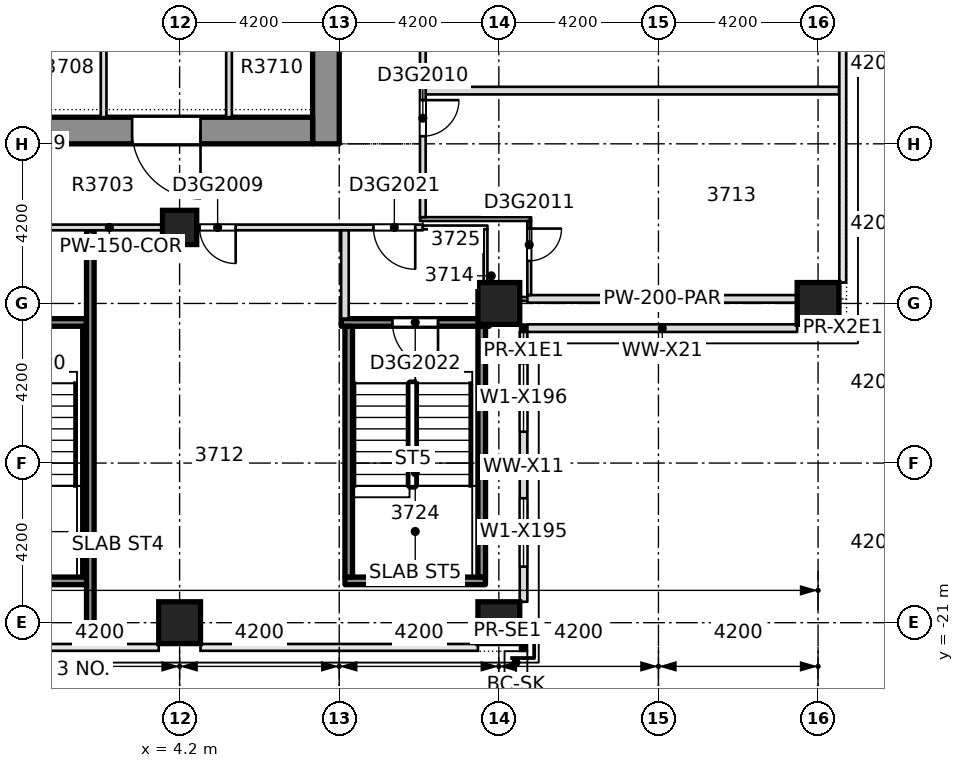
"""IFC4 building model, lengths in metres.
Left out: names, types, materials, properties, quantities, classifications, styles, units other than length and angle.
Written with IfcOpenShell. Run it as: python <this file> out.ifc"""

import sys

from ifc_helpers import new_model, si_unit, direction, frame, frame_2d, origin, origin_2d, place, context, subcontext, project, spatial, rectangle, extrude, element, fill, save


model = new_model("IFC4")
c1 = context("Model", 3, precision=1e-05, world=origin(), true_north=direction((0.0, 1.0)))
c2 = subcontext(c1, "Body", "Model", "MODEL_VIEW")
j1 = project(units=[si_unit("LENGTHUNIT", "METRE"), si_unit("PLANEANGLEUNIT", "RADIAN")], contexts=[c1])
p1 = place(None, origin())
s1 = spatial("IfcSite", under=j1, at=p1, CompositionType="ELEMENT")
p2 = place(p1, origin())
s2 = spatial("IfcBuilding", under=s1, at=p2, CompositionType="ELEMENT")
p3 = place(p2, frame((0.0, 0.0, 146.9)))
s3 = spatial("IfcBuildingStorey", under=s2, at=p3, CompositionType="ELEMENT", Elevation=146.9)
p4 = place(p3, frame((8.05, -8.4, -0.4), z_axis=(0.0, 0.0, 1.0), x_axis=(0.0, 1.0, 0.0)))
e1 = element("IfcWall", 1, at=p4, inside=s3, PredefinedType="SOLIDWALL", context=c2, shape_type="SweptSolid", body=[
    extrude(rectangle(XDim=30.15, YDim=0.7, at=frame_2d((15.075, 0.0))), origin(), (0.0, 0.0, 1.0), 3.45),
])
p5 = place(p4, frame((19.3, 0.0, 0.4)))
e2 = element("IfcOpeningElement", 2, at=p5, cuts=e1, PredefinedType="OPENING", context=c2, shape_type="SweptSolid", body=[
    extrude(rectangle(XDim=1.2, YDim=2.1, at=frame_2d((0.6, 1.05))), frame((0.0, 0.36, 0.0), z_axis=(0.0, -1.0, 0.0), x_axis=(1.0, 0.0, 0.0)), (0.0, 0.0, 1.0), 0.72),
])
p6 = place(p3, frame((-7.7, -8.05, -0.4), z_axis=(0.0, 0.0, 1.0), x_axis=(1.0, 0.0, 0.0)))
e3 = element("IfcWall", 3, at=p6, inside=s3, PredefinedType="SHEAR", context=c2, shape_type="SweptSolid", body=[
    extrude(rectangle(XDim=15.4, YDim=0.7, at=frame_2d((7.7, 0.0))), origin(), (0.0, 0.0, 1.0), 3.45),
])
p7 = place(p6, frame((2.95, 0.0, 0.4)))
e4 = element("IfcOpeningElement", 4, at=p7, cuts=e3, PredefinedType="OPENING", context=c2, shape_type="SweptSolid", body=[
    extrude(rectangle(XDim=1.8, YDim=2.1, at=frame_2d((0.9, 1.05))), frame((0.0, 0.36, 0.0), z_axis=(0.0, -1.0, 0.0), x_axis=(1.0, 0.0, 0.0)), (0.0, 0.0, 1.0), 0.72),
])
p8 = place(p6, frame((10.65, 0.0, 0.4)))
e5 = element("IfcOpeningElement", 5, at=p8, cuts=e3, PredefinedType="OPENING", context=c2, shape_type="SweptSolid", body=[
    extrude(rectangle(XDim=1.8, YDim=2.1, at=frame_2d((0.9, 1.05))), frame((0.0, 0.36, 0.0), z_axis=(0.0, -1.0, 0.0), x_axis=(1.0, 0.0, 0.0)), (0.0, 0.0, 1.0), 0.72),
])
for number, where, z_axis, x_axis in (
    (6, (4.2, -21.0, -0.4), (0.0, 0.0, 1.0), (1.0, 0.0, 0.0)),
    (7, (12.6, -21.0, -0.4), (0.0, 0.0, 1.0), (1.0, 0.0, 0.0)),
    (8, (12.6, -12.6, -0.4), (0.0, 0.0, 1.0), (1.0, 0.0, 0.0)),
    (9, (21.0, -12.6, -0.4), (0.0, 0.0, 1.0), (1.0, 0.0, 0.0)),
):
    element("IfcColumn", number, at=place(p3, frame(where, z_axis=z_axis, x_axis=x_axis)), inside=s3, PredefinedType="COLUMN", context=c2, shape_type="SweptSolid", body=[
        extrude(rectangle(XDim=1.1, YDim=1.1, at=origin_2d()), origin(), (0.0, 0.0, 1.0), 3.45),
    ])
p9 = place(p3, frame((4.2, -10.6, -0.4), z_axis=(0.0, 0.0, 1.0), x_axis=(1.0, 0.0, 0.0)))
e10 = element("IfcColumn", 10, at=p9, inside=s3, PredefinedType="COLUMN", context=c2, shape_type="SweptSolid", body=[
    extrude(rectangle(XDim=0.9, YDim=0.9, at=origin_2d()), origin(), (0.0, 0.0, 1.0), 3.45),
])
p10 = place(p3, frame((-1.848, -19.9, 0.0), z_axis=(0.0, 0.0, 1.0), x_axis=(1.0, 0.0, 0.0)))
e11 = element("IfcWall", 11, at=p10, inside=s3, PredefinedType="SOLIDWALL", context=c2, shape_type="SweptSolid", body=[
    extrude(rectangle(XDim=3.696, YDim=0.2, at=frame_2d((1.848, 0.0))), origin(), (0.0, 0.0, 1.0), 3.05),
])
p11 = place(p3, frame((8.552, -19.9, 0.0), z_axis=(0.0, 0.0, 1.0), x_axis=(1.0, 0.0, 0.0)))
e12 = element("IfcWall", 12, at=p11, inside=s3, PredefinedType="SOLIDWALL", context=c2, shape_type="SweptSolid", body=[
    extrude(rectangle(XDim=3.696, YDim=0.2, at=frame_2d((1.848, 0.0))), origin(), (0.0, 0.0, 1.0), 3.05),
])
p12 = place(p3, frame((-1.948, -13.1, 0.0), z_axis=(0.0, 0.0, 1.0), x_axis=(1.0, 0.0, 0.0)))
e13 = element("IfcWall", 13, at=p12, inside=s3, PredefinedType="SOLIDWALL", context=c2, shape_type="SweptSolid", body=[
    extrude(rectangle(XDim=3.696, YDim=0.2, at=frame_2d((1.848, 0.0))), origin(), (0.0, 0.0, 1.0), 3.05),
])
p13 = place(p12, frame((1.348, 0.0, 0.0)))
e14 = element("IfcOpeningElement", 14, at=p13, cuts=e13, PredefinedType="OPENING", context=c2, shape_type="SweptSolid", body=[
    extrude(rectangle(XDim=1.2, YDim=2.1, at=frame_2d((0.6, 1.05))), frame((0.0, 0.11, 0.0), z_axis=(0.0, -1.0, 0.0), x_axis=(1.0, 0.0, 0.0)), (0.0, 0.0, 1.0), 0.22),
])
p14 = place(p3, frame((8.452, -13.1, 0.0), z_axis=(0.0, 0.0, 1.0), x_axis=(1.0, 0.0, 0.0)))
e15 = element("IfcWall", 15, at=p14, inside=s3, PredefinedType="SOLIDWALL", context=c2, shape_type="SweptSolid", body=[
    extrude(rectangle(XDim=3.896, YDim=0.2, at=frame_2d((1.948, 0.0))), origin(), (0.0, 0.0, 1.0), 3.05),
])
p15 = place(p14, frame((1.348, 0.0, 0.0)))
e16 = element("IfcOpeningElement", 16, at=p15, cuts=e15, PredefinedType="OPENING", context=c2, shape_type="SweptSolid", body=[
    extrude(rectangle(XDim=1.2, YDim=2.1, at=frame_2d((0.6, 1.05))), frame((0.0, 0.11, 0.0), z_axis=(0.0, -1.0, 0.0), x_axis=(1.0, 0.0, 0.0)), (0.0, 0.0, 1.0), 0.22),
])
p16 = place(p3, frame((12.152, -12.48, 0.0), z_axis=(0.0, 0.0, 1.0), x_axis=(1.0, 0.0, 0.0)))
e17 = element("IfcWall", 17, at=p16, inside=s3, PredefinedType="PARTITIONING", context=c2, shape_type="SweptSolid", body=[
    extrude(rectangle(XDim=1.298, YDim=0.1, at=frame_2d((0.649, 0.0))), origin(), (0.0, 0.0, 1.0), 3.05),
])
p17 = place(p3, frame((13.35, -12.48, 0.0), z_axis=(0.0, 0.0, 1.0), x_axis=(1.0, 0.0, 0.0)))
e18 = element("IfcWall", 18, at=p17, inside=s3, PredefinedType="PARTITIONING", context=c2, shape_type="SweptSolid", body=[
    extrude(rectangle(XDim=7.1, YDim=0.2, at=frame_2d((3.55, 0.0))), origin(), (0.0, 0.0, 1.0), 2.5),
])
p18 = place(p3, frame((-5.9, -10.6, 0.0), z_axis=(0.0, 0.0, 1.0), x_axis=(1.0, 0.0, 0.0)))
e19 = element("IfcWall", 19, at=p18, inside=s3, PredefinedType="PARTITIONING", context=c2, shape_type="SweptSolid", body=[
    extrude(rectangle(XDim=16.5, YDim=0.15, at=frame_2d((8.25, 0.0))), origin(), (0.0, 0.0, 1.0), 3.05),
])
p19 = place(p18, frame((2.225, 0.0, 0.0)))
e20 = element("IfcOpeningElement", 20, at=p19, cuts=e19, PredefinedType="OPENING", context=c2, shape_type="SweptSolid", body=[
    extrude(rectangle(XDim=0.95, YDim=2.1, at=frame_2d((0.475, 1.05))), frame((0.0, 0.085, 0.0), z_axis=(0.0, -1.0, 0.0), x_axis=(1.0, 0.0, 0.0)), (0.0, 0.0, 1.0), 0.17),
])
p20 = place(p18, frame((10.625, 0.0, 0.0)))
e21 = element("IfcOpeningElement", 21, at=p20, cuts=e19, PredefinedType="OPENING", context=c2, shape_type="SweptSolid", body=[
    extrude(rectangle(XDim=0.95, YDim=2.1, at=frame_2d((0.475, 1.05))), frame((0.0, 0.085, 0.0), z_axis=(0.0, -1.0, 0.0), x_axis=(1.0, 0.0, 0.0)), (0.0, 0.0, 1.0), 0.17),
])
p21 = place(p18, frame((5.35, 0.0, 0.0)))
e22 = element("IfcOpeningElement", 22, at=p21, cuts=e19, PredefinedType="OPENING", context=c2, shape_type="SweptSolid", body=[
    extrude(rectangle(XDim=1.1, YDim=2.1, at=frame_2d((0.55, 1.05))), frame((0.0, 0.085, 0.0), z_axis=(0.0, -1.0, 0.0), x_axis=(1.0, 0.0, 0.0)), (0.0, 0.0, 1.0), 0.17),
])
p22 = place(p18, frame((15.2, 0.0, 0.0)))
e23 = element("IfcOpeningElement", 23, at=p22, cuts=e19, PredefinedType="OPENING", context=c2, shape_type="SweptSolid", body=[
    extrude(rectangle(XDim=1.1, YDim=2.1, at=frame_2d((0.55, 1.05))), frame((0.0, 0.085, 0.0), z_axis=(0.0, -1.0, 0.0), x_axis=(1.0, 0.0, 0.0)), (0.0, 0.0, 1.0), 0.17),
])
p23 = place(p3, frame((10.6, -10.6, 0.0), z_axis=(0.0, 0.0, 1.0), x_axis=(1.0, 0.0, 0.0)))
e24 = element("IfcWall", 24, at=p23, inside=s3, PredefinedType="PARTITIONING", context=c2, shape_type="SweptSolid", body=[
    extrude(rectangle(XDim=1.7, YDim=0.1, at=frame_2d((0.85, 0.0))), origin(), (0.0, 0.0, 1.0), 3.05),
])
p24 = place(p3, frame((10.525, -10.38, 0.0), z_axis=(0.0, 0.0, 1.0), x_axis=(1.0, 0.0, 0.0)))
e25 = element("IfcWall", 25, at=p24, inside=s3, PredefinedType="PARTITIONING", context=c2, shape_type="SweptSolid", body=[
    extrude(rectangle(XDim=2.925, YDim=0.1, at=frame_2d((1.462, 0.0))), origin(), (0.0, 0.0, 1.0), 3.05),
])
p25 = place(p3, frame((10.675, -7.0, 0.0), z_axis=(0.0, 0.0, 1.0), x_axis=(1.0, 0.0, 0.0)))
e26 = element("IfcWall", 26, at=p25, inside=s3, PredefinedType="PARTITIONING", context=c2, shape_type="SweptSolid", body=[
    extrude(rectangle(XDim=10.875, YDim=0.2, at=frame_2d((5.438, 0.0))), origin(), (0.0, 0.0, 1.0), 3.05),
])
p26 = place(p3, frame((1.75, -19.798, 0.0), z_axis=(0.0, 0.0, 1.0), x_axis=(0.0, 1.0, 0.0)))
e27 = element("IfcWall", 27, at=p26, inside=s3, PredefinedType="SOLIDWALL", context=c2, shape_type="SweptSolid", body=[
    extrude(rectangle(XDim=6.596, YDim=0.2, at=frame_2d((3.298, 0.0))), origin(), (0.0, 0.0, 1.0), 3.05),
])
p27 = place(p3, frame((8.55, -12.998, 0.0), z_axis=(0.0, 0.0, 1.0), x_axis=(0.0, 1.0, 0.0)))
e28 = element("IfcWall", 28, at=p27, inside=s3, PredefinedType="PARTITIONING", context=c2, shape_type="SweptSolid", body=[
    extrude(rectangle(XDim=2.323, YDim=0.2, at=frame_2d((1.162, 0.0))), origin(), (0.0, 0.0, 1.0), 3.05),
])
p28 = place(p3, frame((8.65, -19.798, 0.0), z_axis=(0.0, 0.0, 1.0), x_axis=(0.0, 1.0, 0.0)))
e29 = element("IfcWall", 29, at=p28, inside=s3, PredefinedType="SOLIDWALL", context=c2, shape_type="SweptSolid", body=[
    extrude(rectangle(XDim=6.596, YDim=0.2, at=frame_2d((3.298, 0.0))), origin(), (0.0, 0.0, 1.0), 3.05),
])
p29 = place(p3, frame((10.6, -10.33, 0.0), z_axis=(0.0, 0.0, 1.0), x_axis=(0.0, 1.0, 0.0)))
e30 = element("IfcWall", 30, at=p29, inside=s3, PredefinedType="PARTITIONING", context=c2, shape_type="SweptSolid", body=[
    extrude(rectangle(XDim=18.75, YDim=0.15, at=frame_2d((9.375, 0.0))), origin(), (0.0, 0.0, 1.0), 3.05),
])
p30 = place(p29, frame((2.13, 0.0, 0.0)))
e31 = element("IfcOpeningElement", 31, at=p30, cuts=e30, PredefinedType="OPENING", context=c2, shape_type="SweptSolid", body=[
    extrude(rectangle(XDim=0.95, YDim=2.1, at=frame_2d((0.475, 1.05))), frame((0.0, 0.085, 0.0), z_axis=(0.0, -1.0, 0.0), x_axis=(1.0, 0.0, 0.0)), (0.0, 0.0, 1.0), 0.17),
])
p31 = place(p29, frame((15.79, 0.0, 0.0)))
e32 = element("IfcOpeningElement", 32, at=p31, cuts=e30, PredefinedType="OPENING", context=c2, shape_type="SweptSolid", body=[
    extrude(rectangle(XDim=0.95, YDim=2.1, at=frame_2d((0.475, 1.05))), frame((0.0, 0.085, 0.0), z_axis=(0.0, -1.0, 0.0), x_axis=(1.0, 0.0, 0.0)), (0.0, 0.0, 1.0), 0.17),
])
p32 = place(p29, frame((9.78, 0.0, 0.0)))
e33 = element("IfcOpeningElement", 33, at=p32, cuts=e30, PredefinedType="OPENING", context=c2, shape_type="SweptSolid", body=[
    extrude(rectangle(XDim=1.1, YDim=2.1, at=frame_2d((0.55, 1.05))), frame((0.0, 0.085, 0.0), z_axis=(0.0, -1.0, 0.0), x_axis=(1.0, 0.0, 0.0)), (0.0, 0.0, 1.0), 0.17),
])
p33 = place(p29, frame((4.63, 0.0, 0.0)))
e34 = element("IfcOpeningElement", 34, at=p33, cuts=e30, PredefinedType="OPENING", context=c2, shape_type="SweptSolid", body=[
    extrude(rectangle(XDim=1.0, YDim=2.1, at=frame_2d((0.5, 1.05))), frame((0.0, 0.085, 0.0), z_axis=(0.0, -1.0, 0.0), x_axis=(1.0, 0.0, 0.0)), (0.0, 0.0, 1.0), 0.17),
])
p34 = place(p3, frame((12.15, -19.798, 0.0), z_axis=(0.0, 0.0, 1.0), x_axis=(0.0, 1.0, 0.0)))
e35 = element("IfcWall", 35, at=p34, inside=s3, PredefinedType="SOLIDWALL", context=c2, shape_type="SweptSolid", body=[
    extrude(rectangle(XDim=6.596, YDim=0.2, at=frame_2d((3.298, 0.0))), origin(), (0.0, 0.0, 1.0), 3.05),
])
p35 = place(p3, frame((12.25, -12.998, 0.0), z_axis=(0.0, 0.0, 1.0), x_axis=(0.0, 1.0, 0.0)))
e36 = element("IfcWall", 36, at=p35, inside=s3, PredefinedType="PARTITIONING", context=c2, shape_type="SweptSolid", body=[
    extrude(rectangle(XDim=0.466, YDim=0.2, at=frame_2d((0.233, 0.0))), origin(), (0.0, 0.0, 1.0), 3.05),
])
p36 = place(p3, frame((12.25, -12.43, 0.0), z_axis=(0.0, 0.0, 1.0), x_axis=(0.0, 1.0, 0.0)))
e37 = element("IfcWall", 37, at=p36, inside=s3, PredefinedType="PARTITIONING", context=c2, shape_type="SweptSolid", body=[
    extrude(rectangle(XDim=1.78, YDim=0.1, at=frame_2d((0.89, 0.0))), origin(), (0.0, 0.0, 1.0), 3.05),
])
p37 = place(p3, frame((13.4, -12.38, 0.0), z_axis=(0.0, 0.0, 1.0), x_axis=(0.0, 1.0, 0.0)))
e38 = element("IfcWall", 38, at=p37, inside=s3, PredefinedType="PARTITIONING", context=c2, shape_type="SweptSolid", body=[
    extrude(rectangle(XDim=1.95, YDim=0.1, at=frame_2d((0.975, 0.0))), origin(), (0.0, 0.0, 1.0), 3.05),
])
p38 = place(p37, frame((0.9, 0.0, 0.0)))
e39 = element("IfcOpeningElement", 39, at=p38, cuts=e38, PredefinedType="OPENING", context=c2, shape_type="SweptSolid", body=[
    extrude(rectangle(XDim=0.85, YDim=2.1, at=frame_2d((0.425, 1.05))), frame((0.0, 0.06, 0.0), z_axis=(0.0, -1.0, 0.0), x_axis=(1.0, 0.0, 0.0)), (0.0, 0.0, 1.0), 0.12),
])
p39 = place(p3, frame((13.25, -20.45, 0.0), z_axis=(0.0, 0.0, 1.0), x_axis=(0.0, 1.0, 0.0)))
e40 = element("IfcWall", 40, at=p39, inside=s3, PredefinedType="STANDARD", context=c2, shape_type="SweptSolid", body=[
    extrude(rectangle(XDim=7.1, YDim=0.2, at=frame_2d((3.55, 0.0))), origin(), (0.0, 0.0, 1.0), 3.05),
])
p40 = place(p39, frame((0.925, 0.0, 0.2)))
e41 = element("IfcOpeningElement", 41, at=p40, cuts=e40, PredefinedType="OPENING", context=c2, shape_type="SweptSolid", body=[
    extrude(rectangle(XDim=1.8, YDim=2.65, at=frame_2d((0.9, 1.325))), frame((0.0, 0.11, 0.0), z_axis=(0.0, -1.0, 0.0), x_axis=(1.0, 0.0, 0.0)), (0.0, 0.0, 1.0), 0.22),
])
p41 = place(p39, frame((4.475, 0.0, 0.2)))
e42 = element("IfcOpeningElement", 42, at=p41, cuts=e40, PredefinedType="OPENING", context=c2, shape_type="SweptSolid", body=[
    extrude(rectangle(XDim=1.8, YDim=2.65, at=frame_2d((0.9, 1.325))), frame((0.0, 0.11, 0.0), z_axis=(0.0, -1.0, 0.0), x_axis=(1.0, 0.0, 0.0)), (0.0, 0.0, 1.0), 0.22),
])
p42 = place(p3, frame((13.35, -13.25, 0.0), z_axis=(0.0, 0.0, 1.0), x_axis=(1.0, 0.0, 0.0)))
e43 = element("IfcWall", 43, at=p42, inside=s3, PredefinedType="STANDARD", context=c2, shape_type="SweptSolid", body=[
    extrude(rectangle(XDim=7.1, YDim=0.2, at=frame_2d((3.55, 0.0))), origin(), (0.0, 0.0, 1.0), 3.05),
])
p43 = place(p3, frame((2.2, -7.699, 0.0), z_axis=(0.0, 0.0, 1.0), x_axis=(0.0, 1.0, 0.0)))
e44 = element("IfcWall", 44, at=p43, inside=s3, PredefinedType="PARTITIONING", context=c2, shape_type="SweptSolid", body=[
    extrude(rectangle(XDim=12.124, YDim=0.15, at=frame_2d((6.062, 0.0))), origin(), (0.0, 0.0, 1.0), 3.05),
])
p44 = place(p43, frame((2.724, 0.0, 0.0)))
e45 = element("IfcOpeningElement", 45, at=p44, cuts=e44, PredefinedType="OPENING", context=c2, shape_type="SweptSolid", body=[
    extrude(rectangle(XDim=0.95, YDim=2.1, at=frame_2d((0.475, 1.05))), frame((0.0, 0.085, 0.0), z_axis=(0.0, -1.0, 0.0), x_axis=(1.0, 0.0, 0.0)), (0.0, 0.0, 1.0), 0.17),
])
p45 = place(p43, frame((8.724, 0.0, 0.0)))
e46 = element("IfcOpeningElement", 46, at=p45, cuts=e44, PredefinedType="OPENING", context=c2, shape_type="SweptSolid", body=[
    extrude(rectangle(XDim=0.95, YDim=2.1, at=frame_2d((0.475, 1.05))), frame((0.0, 0.085, 0.0), z_axis=(0.0, -1.0, 0.0), x_axis=(1.0, 0.0, 0.0)), (0.0, 0.0, 1.0), 0.17),
])
p46 = place(p3, frame((5.5, -7.699, 0.0), z_axis=(0.0, 0.0, 1.0), x_axis=(0.0, 1.0, 0.0)))
e47 = element("IfcWall", 47, at=p46, inside=s3, PredefinedType="PARTITIONING", context=c2, shape_type="SweptSolid", body=[
    extrude(rectangle(XDim=12.124, YDim=0.15, at=frame_2d((6.062, 0.0))), origin(), (0.0, 0.0, 1.0), 3.05),
])
p47 = place(p46, frame((2.724, 0.0, 0.0)))
e48 = element("IfcOpeningElement", 48, at=p47, cuts=e47, PredefinedType="OPENING", context=c2, shape_type="SweptSolid", body=[
    extrude(rectangle(XDim=0.95, YDim=2.1, at=frame_2d((0.475, 1.05))), frame((0.0, 0.085, 0.0), z_axis=(0.0, -1.0, 0.0), x_axis=(1.0, 0.0, 0.0)), (0.0, 0.0, 1.0), 0.17),
])
p48 = place(p46, frame((8.724, 0.0, 0.0)))
e49 = element("IfcOpeningElement", 49, at=p48, cuts=e47, PredefinedType="OPENING", context=c2, shape_type="SweptSolid", body=[
    extrude(rectangle(XDim=0.95, YDim=2.1, at=frame_2d((0.475, 1.05))), frame((0.0, 0.085, 0.0), z_axis=(0.0, -1.0, 0.0), x_axis=(1.0, 0.0, 0.0)), (0.0, 0.0, 1.0), 0.17),
])
p49 = place(p3, frame((1.85, -21.55, 0.0), z_axis=(0.0, 0.0, 1.0), x_axis=(0.0, 1.0, 0.0)))
e50 = element("IfcWall", 50, at=p49, inside=s3, PredefinedType="SOLIDWALL", context=c2, shape_type="SweptSolid", body=[
    extrude(rectangle(XDim=10.875, YDim=0.2, at=frame_2d((5.438, 0.0))), origin(), (0.0, 0.0, 1.0), 3.05),
])
p50 = place(p3, frame((20.45, -12.48, 0.0), z_axis=(0.0, 0.0, 1.0), x_axis=(1.0, 0.0, 0.0)))
e51 = element("IfcWall", 51, at=p50, inside=s3, PredefinedType="PARTITIONING", context=c2, shape_type="SweptSolid", body=[
    extrude(rectangle(XDim=1.1, YDim=0.2, at=frame_2d((0.55, 0.0))), origin(), (0.0, 0.0, 1.0), 3.05),
])
p51 = place(p20, origin())
e52 = element("IfcDoor", 52, at=p51, inside=s3, OperationType="SINGLE_SWING_RIGHT", PredefinedType="DOOR", context=c2, shape_type="SweptSolid", body=[
    extrude(rectangle(XDim=0.95, YDim=2.1, at=frame_2d((0.475, 1.05))), frame((0.0, 0.025, 0.0), z_axis=(0.0, -1.0, 0.0), x_axis=(1.0, 0.0, 0.0)), (0.0, 0.0, 1.0), 0.05),
])
fill(e21, e52)
p52 = place(p30, origin())
e53 = element("IfcDoor", 53, at=p52, inside=s3, OperationType="SINGLE_SWING_LEFT", PredefinedType="DOOR", context=c2, shape_type="SweptSolid", body=[
    extrude(rectangle(XDim=0.95, YDim=2.1, at=frame_2d((0.475, 1.05))), frame((0.0, 0.025, 0.0), z_axis=(0.0, -1.0, 0.0), x_axis=(1.0, 0.0, 0.0)), (0.0, 0.0, 1.0), 0.05),
])
fill(e31, e53)
p53 = place(p38, origin())
e54 = element("IfcDoor", 54, at=p53, inside=s3, OperationType="SINGLE_SWING_LEFT", PredefinedType="DOOR", context=c2, shape_type="SweptSolid", body=[
    extrude(rectangle(XDim=0.85, YDim=2.1, at=frame_2d((0.425, 1.05))), frame((0.0, 0.025, 0.0), z_axis=(0.0, -1.0, 0.0), x_axis=(1.0, 0.0, 0.0)), (0.0, 0.0, 1.0), 0.05),
])
fill(e39, e54)
p54 = place(p22, origin())
e55 = element("IfcDoor", 55, at=p54, inside=s3, OperationType="SINGLE_SWING_RIGHT", PredefinedType="DOOR", context=c2, shape_type="SweptSolid", body=[
    extrude(rectangle(XDim=1.1, YDim=2.1, at=frame_2d((0.55, 1.05))), frame((0.0, 0.025, 0.0), z_axis=(0.0, -1.0, 0.0), x_axis=(1.0, 0.0, 0.0)), (0.0, 0.0, 1.0), 0.05),
])
fill(e23, e55)
p55 = place(p15, origin())
e56 = element("IfcDoor", 56, at=p55, inside=s3, OperationType="SINGLE_SWING_RIGHT", PredefinedType="DOOR", context=c2, shape_type="SweptSolid", body=[
    extrude(rectangle(XDim=1.2, YDim=2.1, at=frame_2d((0.6, 1.05))), frame((0.0, 0.025, 0.0), z_axis=(0.0, -1.0, 0.0), x_axis=(1.0, 0.0, 0.0)), (0.0, 0.0, 1.0), 0.05),
])
fill(e16, e56)
p56 = place(p40, origin())
e57 = element("IfcWindow", 57, at=p56, inside=s3, PartitioningType="SINGLE_PANEL", PredefinedType="WINDOW", context=c2, shape_type="SweptSolid", body=[
    extrude(rectangle(XDim=1.8, YDim=2.65, at=frame_2d((0.9, 1.325))), frame((0.0, 0.03, 0.0), z_axis=(0.0, -1.0, 0.0), x_axis=(1.0, 0.0, 0.0)), (0.0, 0.0, 1.0), 0.06),
])
fill(e41, e57)
p57 = place(p41, origin())
e58 = element("IfcWindow", 58, at=p57, inside=s3, PartitioningType="SINGLE_PANEL", PredefinedType="WINDOW", context=c2, shape_type="SweptSolid", body=[
    extrude(rectangle(XDim=1.8, YDim=2.65, at=frame_2d((0.9, 1.325))), frame((0.0, 0.03, 0.0), z_axis=(0.0, -1.0, 0.0), x_axis=(1.0, 0.0, 0.0)), (0.0, 0.0, 1.0), 0.06),
])
fill(e42, e58)
p58 = place(p8, origin())
e59 = element("IfcDoor", 59, at=p58, inside=s3, OperationType="SINGLE_SWING_LEFT", PredefinedType="DOOR", context=c2, shape_type="SweptSolid", body=[
    extrude(rectangle(XDim=1.8, YDim=2.1, at=frame_2d((0.9, 1.05))), frame((0.0, 0.025, 0.0), z_axis=(0.0, -1.0, 0.0), x_axis=(1.0, 0.0, 0.0)), (0.0, 0.0, 1.0), 0.05),
])
fill(e5, e59)
save(model, sys.argv[1])
